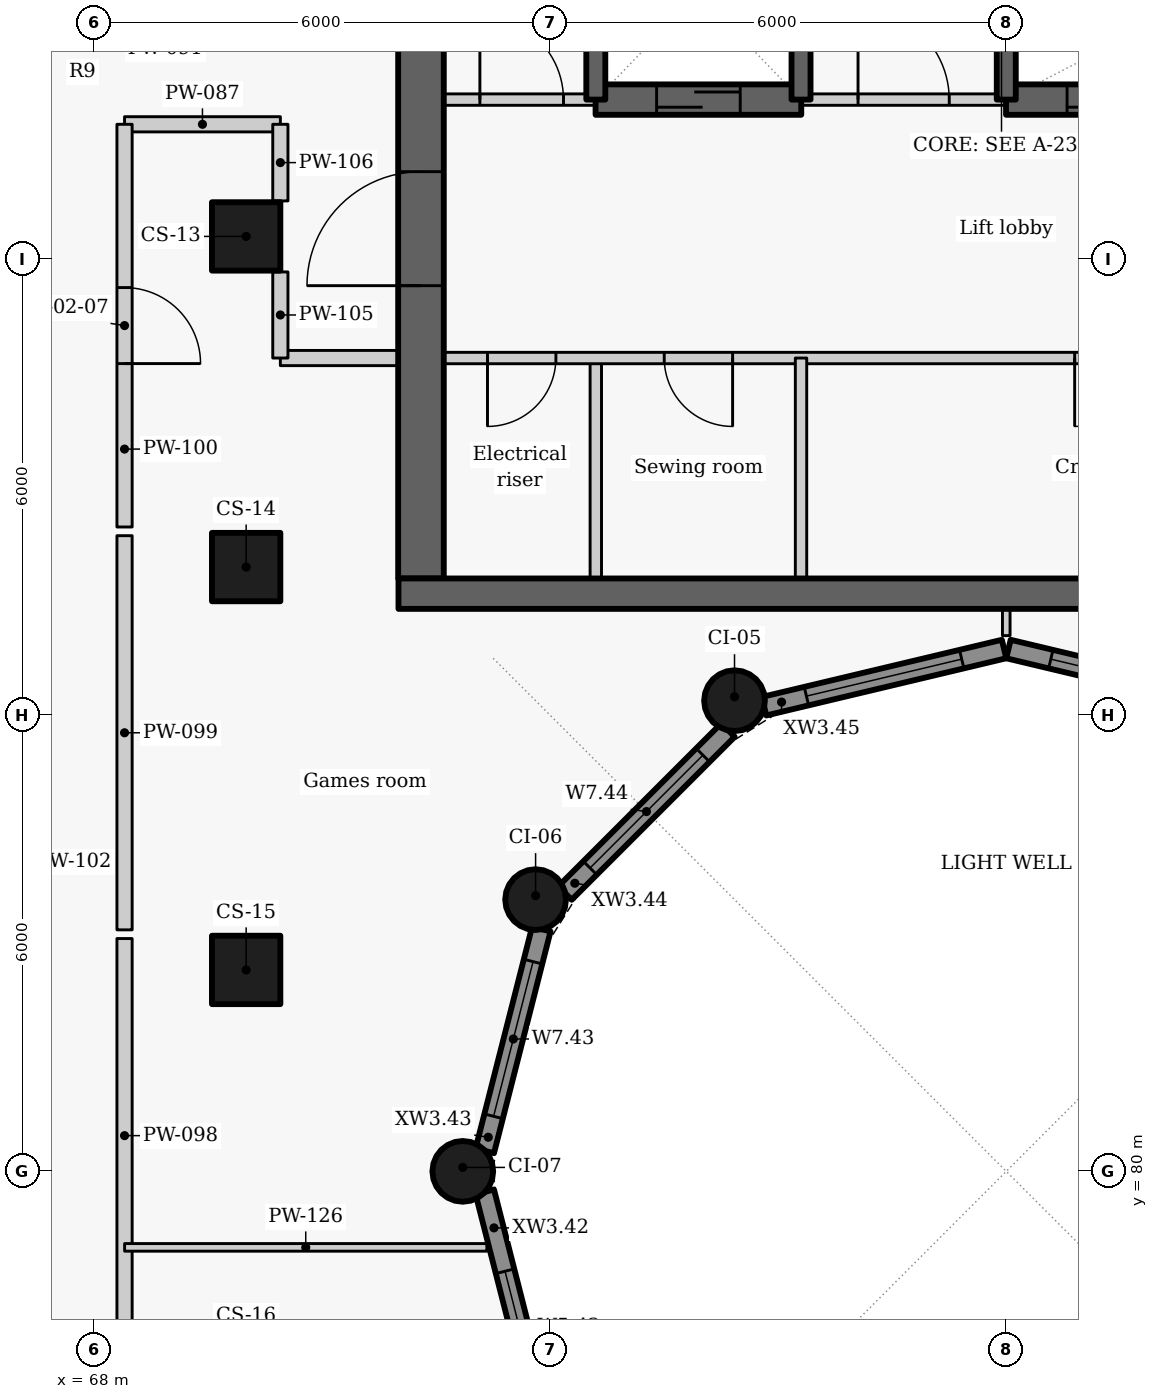
"""IFC4 building model, lengths in metres.
Left out: names, types, materials, properties, quantities, classifications, styles, units other than length and angle.
Written with IfcOpenShell. Run it as: python <this file> out.ifc"""

import sys

from ifc_helpers import new_model, si_unit, direction, frame, frame_2d, origin, origin_2d, place, context, subcontext, project, spatial, rectangle, circle, extrude, element, fill, save


model = new_model("IFC4")
c1 = context("Model", 3, precision=1e-05, world=origin(), true_north=direction((0.0, 1.0)))
c2 = subcontext(c1, "Body", "Model", "MODEL_VIEW")
j1 = project(units=[si_unit("LENGTHUNIT", "METRE"), si_unit("PLANEANGLEUNIT", "RADIAN")], contexts=[c1])
p1 = place(None, origin())
s1 = spatial("IfcSite", under=j1, at=p1, CompositionType="ELEMENT")
p2 = place(p1, origin())
s2 = spatial("IfcBuilding", under=s1, at=p2, CompositionType="ELEMENT")
p3 = place(p2, frame((0.0, 0.0, 183.3)))
s3 = spatial("IfcBuildingStorey", under=s2, at=p3, CompositionType="ELEMENT", Elevation=183.3)
for number, where, z_axis, x_axis in (
    (1, (70.0, 92.3, 0.0), (0.0, 0.0, 1.0), (0.0, -1.0, 0.0)),
    (2, (70.0, 87.95, 0.0), (0.0, 0.0, 1.0), (0.0, -1.0, 0.0)),
    (3, (70.0, 82.65, 0.0), (0.0, 0.0, 1.0), (0.0, -1.0, 0.0)),
):
    element("IfcColumn", number, at=place(p3, frame(where, z_axis=z_axis, x_axis=x_axis)), inside=s3, PredefinedType="COLUMN", context=c2, shape_type="SweptSolid", body=[
        extrude(rectangle(XDim=0.9, YDim=0.9, at=origin_2d()), origin(), (0.0, 0.0, 1.0), 3.3),
    ])
for number, where, z_axis, x_axis in (
    (4, (76.425, 86.192, 0.0), (0.0, 0.0, 1.0), (-0.866, -0.5, 0.0)),
    (5, (73.808, 83.575, 0.0), (0.0, 0.0, 1.0), (-0.5, -0.866, 0.0)),
    (6, (72.85, 80.0, 0.0), (0.0, 0.0, 1.0), (0.0, -1.0, 0.0)),
):
    element("IfcColumn", number, at=place(p3, frame(where, z_axis=z_axis, x_axis=x_axis)), inside=s3, PredefinedType="COLUMN", context=c2, shape_type="SweptSolid", body=[
        extrude(circle(Radius=0.4, at=origin_2d()), origin(), (0.0, 0.0, 1.0), 3.3),
    ])
p4 = place(p3, frame((73.883, 76.813, 0.0), z_axis=(0.0, 0.0, 1.0), x_axis=(-0.247055971283, 0.969001211069, 0.0)))
e7 = element("IfcWall", 7, at=p4, inside=s3, PredefinedType="SOLIDWALL", context=c2, shape_type="SweptSolid", body=[
    extrude(rectangle(XDim=3.01, YDim=0.25, at=frame_2d((1.505, 0.0))), origin(), (0.0, 0.0, 1.0), 2.425),
])
p5 = place(p4, frame((0.433, 0.0, 0.9)))
e8 = element("IfcOpeningElement", 8, at=p5, cuts=e7, PredefinedType="OPENING", context=c2, shape_type="SweptSolid", body=[
    extrude(rectangle(XDim=1.5, YDim=1.1, at=frame_2d((0.75, 0.55))), frame((0.0, 0.135, 0.0), z_axis=(0.0, -1.0, 0.0), x_axis=(1.0, 0.0, 0.0)), (0.0, 0.0, 1.0), 0.27),
])
p6 = place(p3, frame((73.14, 80.27, 0.0), z_axis=(0.0, 0.0, 1.0), x_axis=(0.247055971283, 0.969001211069, 0.0)))
e9 = element("IfcWall", 9, at=p6, inside=s3, PredefinedType="SOLIDWALL", context=c2, shape_type="SweptSolid", body=[
    extrude(rectangle(XDim=3.01, YDim=0.25, at=frame_2d((1.505, 0.0))), origin(), (0.0, 0.0, 1.0), 2.425),
])
p7 = place(p6, frame((0.469, 0.0, 0.9)))
e10 = element("IfcOpeningElement", 10, at=p7, cuts=e9, PredefinedType="OPENING", context=c2, shape_type="SweptSolid", body=[
    extrude(rectangle(XDim=2.1, YDim=1.1, at=frame_2d((1.05, 0.55))), frame((0.0, 0.135, 0.0), z_axis=(0.0, -1.0, 0.0), x_axis=(1.0, 0.0, 0.0)), (0.0, 0.0, 1.0), 0.27),
])
p8 = place(p3, frame((74.194, 83.661, 0.0), z_axis=(0.0, 0.0, 1.0), x_axis=(0.707106781187, 0.707106781187, 0.0)))
e11 = element("IfcWall", 11, at=p8, inside=s3, PredefinedType="SOLIDWALL", context=c2, shape_type="SweptSolid", body=[
    extrude(rectangle(XDim=3.033, YDim=0.25, at=frame_2d((1.517, 0.0))), origin(), (0.0, 0.0, 1.0), 2.425),
])
p9 = place(p8, frame((0.467, 0.0, 0.9)))
e12 = element("IfcOpeningElement", 12, at=p9, cuts=e11, PredefinedType="OPENING", context=c2, shape_type="SweptSolid", body=[
    extrude(rectangle(XDim=2.1, YDim=1.1, at=frame_2d((1.05, 0.55))), frame((0.0, 0.135, 0.0), z_axis=(0.0, -1.0, 0.0), x_axis=(1.0, 0.0, 0.0)), (0.0, 0.0, 1.0), 0.27),
])
p10 = place(p3, frame((76.814, 86.119, 0.0), z_axis=(0.0, 0.0, 1.0), x_axis=(0.972773113459, 0.231759508395, 0.0)))
e13 = element("IfcWall", 13, at=p10, inside=s3, PredefinedType="SOLIDWALL", context=c2, shape_type="SweptSolid", body=[
    extrude(rectangle(XDim=3.246, YDim=0.25, at=frame_2d((1.623, 0.0))), origin(), (0.0, 0.0, 1.0), 2.425),
])
p11 = place(p10, frame((0.573, 0.0, 0.9)))
e14 = element("IfcOpeningElement", 14, at=p11, cuts=e13, PredefinedType="OPENING", context=c2, shape_type="SweptSolid", body=[
    extrude(rectangle(XDim=2.1, YDim=1.1, at=frame_2d((1.05, 0.55))), frame((0.0, 0.135, 0.0), z_axis=(0.0, -1.0, 0.0), x_axis=(1.0, 0.0, 0.0)), (0.0, 0.0, 1.0), 0.27),
])
p12 = place(p3, frame((80.029, 86.872, 0.0), z_axis=(0.0, 0.0, 1.0), x_axis=(0.972773113459, -0.231759508395, 0.0)))
e15 = element("IfcWall", 15, at=p12, inside=s3, PredefinedType="SOLIDWALL", context=c2, shape_type="SweptSolid", body=[
    extrude(rectangle(XDim=3.246, YDim=0.25, at=frame_2d((1.623, 0.0))), origin(), (0.0, 0.0, 1.0), 2.425),
])
p13 = place(p12, frame((0.573, 0.0, 0.9)))
e16 = element("IfcOpeningElement", 16, at=p13, cuts=e15, PredefinedType="OPENING", context=c2, shape_type="SweptSolid", body=[
    extrude(rectangle(XDim=2.1, YDim=1.1, at=frame_2d((1.05, 0.55))), frame((0.0, 0.135, 0.0), z_axis=(0.0, -1.0, 0.0), x_axis=(1.0, 0.0, 0.0)), (0.0, 0.0, 1.0), 0.27),
])
p14 = place(p3, frame((74.6, 87.8, 0.0), z_axis=(0.0, 0.0, 1.0), x_axis=(0.0, 1.0, 0.0)))
e17 = element("IfcWall", 17, at=p14, inside=s3, PredefinedType="PARTITIONING", context=c2, shape_type="SweptSolid", body=[
    extrude(rectangle(XDim=2.9, YDim=0.15, at=frame_2d((1.45, 0.0))), origin(), (0.0, 0.0, 1.0), 3.025),
])
p15 = place(p3, frame((85.4, 90.7, 0.0), z_axis=(0.0, 0.0, 1.0), x_axis=(-1.0, 0.0, 0.0)))
e18 = element("IfcWall", 18, at=p15, inside=s3, PredefinedType="PARTITIONING", context=c2, shape_type="SweptSolid", body=[
    extrude(rectangle(XDim=13.4, YDim=0.15, at=frame_2d((6.7, 0.0))), origin(), (0.0, 0.0, 1.0), 3.025),
])
p16 = place(p15, frame((11.325, 0.0, 0.0)))
e19 = element("IfcOpeningElement", 19, at=p16, cuts=e18, PredefinedType="OPENING", context=c2, shape_type="SweptSolid", body=[
    extrude(rectangle(XDim=0.9, YDim=2.1, at=frame_2d((0.45, 1.05))), frame((0.0, 0.085, 0.0), z_axis=(0.0, -1.0, 0.0), x_axis=(1.0, 0.0, 0.0)), (0.0, 0.0, 1.0), 0.17),
])
p17 = place(p15, frame((9.0, 0.0, 0.0)))
e20 = element("IfcOpeningElement", 20, at=p17, cuts=e18, PredefinedType="OPENING", context=c2, shape_type="SweptSolid", body=[
    extrude(rectangle(XDim=0.9, YDim=2.1, at=frame_2d((0.45, 1.05))), frame((0.0, 0.085, 0.0), z_axis=(0.0, -1.0, 0.0), x_axis=(1.0, 0.0, 0.0)), (0.0, 0.0, 1.0), 0.17),
])
p18 = place(p15, frame((3.6, 0.0, 0.0)))
e21 = element("IfcOpeningElement", 21, at=p18, cuts=e18, PredefinedType="OPENING", context=c2, shape_type="SweptSolid", body=[
    extrude(rectangle(XDim=0.9, YDim=2.1, at=frame_2d((0.45, 1.05))), frame((0.0, 0.085, 0.0), z_axis=(0.0, -1.0, 0.0), x_axis=(1.0, 0.0, 0.0)), (0.0, 0.0, 1.0), 0.17),
])
p19 = place(p3, frame((72.3, 87.8, -0.275), z_axis=(0.0, 0.0, 1.0), x_axis=(0.0, 1.0, 0.0)))
e22 = element("IfcWall", 22, at=p19, inside=s3, PredefinedType="SHEAR", context=c2, shape_type="SweptSolid", body=[
    extrude(rectangle(XDim=9.1, YDim=0.6, at=frame_2d((4.55, 0.0))), origin(), (0.0, 0.0, 1.0), 3.3),
])
p20 = place(p19, frame((3.852, 0.0, 0.275)))
e23 = element("IfcOpeningElement", 23, at=p20, cuts=e22, PredefinedType="OPENING", context=c2, shape_type="SweptSolid", body=[
    extrude(rectangle(XDim=1.5, YDim=2.1, at=frame_2d((0.75, 1.05))), frame((0.0, 0.31, 0.0), z_axis=(0.0, -1.0, 0.0), x_axis=(1.0, 0.0, 0.0)), (0.0, 0.0, 1.0), 0.62),
])
p21 = place(p3, frame((77.3, 87.8, 0.0), z_axis=(0.0, 0.0, 1.0), x_axis=(0.0, 1.0, 0.0)))
e24 = element("IfcWall", 24, at=p21, inside=s3, PredefinedType="PARTITIONING", context=c2, shape_type="SweptSolid", body=[
    extrude(rectangle(XDim=2.9, YDim=0.15, at=frame_2d((1.45, 0.0))), origin(), (0.0, 0.0, 1.0), 3.025),
])
p22 = place(p3, frame((72.0, 94.1, 0.0), z_axis=(0.0, 0.0, 1.0), x_axis=(1.0, 0.0, 0.0)))
e25 = element("IfcWall", 25, at=p22, inside=s3, PredefinedType="PARTITIONING", context=c2, shape_type="SweptSolid", body=[
    extrude(rectangle(XDim=2.603, YDim=0.15, at=frame_2d((1.302, 0.0))), origin(), (0.0, 0.0, 1.0), 3.025),
])
p23 = place(p22, frame((1.075, 0.0, 0.0)))
e26 = element("IfcOpeningElement", 26, at=p23, cuts=e25, PredefinedType="OPENING", context=c2, shape_type="SweptSolid", body=[
    extrude(rectangle(XDim=1.1, YDim=2.1, at=frame_2d((0.55, 1.05))), frame((0.0, 0.085, 0.0), z_axis=(0.0, -1.0, 0.0), x_axis=(1.0, 0.0, 0.0)), (0.0, 0.0, 1.0), 0.17),
])
p24 = place(p3, frame((77.297, 94.1, 0.0), z_axis=(0.0, 0.0, 1.0), x_axis=(1.0, 0.0, 0.0)))
e27 = element("IfcWall", 27, at=p24, inside=s3, PredefinedType="PARTITIONING", context=c2, shape_type="SweptSolid", body=[
    extrude(rectangle(XDim=2.706, YDim=0.15, at=frame_2d((1.353, 0.0))), origin(), (0.0, 0.0, 1.0), 3.025),
])
p25 = place(p24, frame((0.753, 0.0, 0.0)))
e28 = element("IfcOpeningElement", 28, at=p25, cuts=e27, PredefinedType="OPENING", context=c2, shape_type="SweptSolid", body=[
    extrude(rectangle(XDim=1.2, YDim=2.1, at=frame_2d((0.6, 1.05))), frame((0.0, 0.085, 0.0), z_axis=(0.0, -1.0, 0.0), x_axis=(1.0, 0.0, 0.0)), (0.0, 0.0, 1.0), 0.17),
])
p26 = place(p3, frame((74.597, 94.1, -0.275), z_axis=(0.0, 0.0, 1.0), x_axis=(1.0, 0.0, 0.0)))
e29 = element("IfcWall", 29, at=p26, inside=s3, PredefinedType="SHEAR", context=c2, shape_type="SweptSolid", body=[
    extrude(rectangle(XDim=2.706, YDim=0.4, at=frame_2d((1.353, 0.0))), origin(), (0.0, 0.0, 1.0), 3.3),
])
p27 = place(p26, frame((0.803, 0.0, 0.275)))
e30 = element("IfcOpeningElement", 30, at=p27, cuts=e29, PredefinedType="OPENING", context=c2, shape_type="SweptSolid", body=[
    extrude(rectangle(XDim=1.1, YDim=2.1, at=frame_2d((0.55, 1.05))), frame((0.0, 0.21, 0.0), z_axis=(0.0, -1.0, 0.0), x_axis=(1.0, 0.0, 0.0)), (0.0, 0.0, 1.0), 0.42),
])
p28 = place(p3, frame((79.997, 94.1, -0.275), z_axis=(0.0, 0.0, 1.0), x_axis=(1.0, 0.0, 0.0)))
e31 = element("IfcWall", 31, at=p28, inside=s3, PredefinedType="SHEAR", context=c2, shape_type="SweptSolid", body=[
    extrude(rectangle(XDim=5.406, YDim=0.4, at=frame_2d((2.703, 0.0))), origin(), (0.0, 0.0, 1.0), 3.3),
])
p29 = place(p28, frame((0.803, 0.0, 0.275)))
e32 = element("IfcOpeningElement", 32, at=p29, cuts=e31, PredefinedType="OPENING", context=c2, shape_type="SweptSolid", body=[
    extrude(rectangle(XDim=1.1, YDim=2.1, at=frame_2d((0.55, 1.05))), frame((0.0, 0.21, 0.0), z_axis=(0.0, -1.0, 0.0), x_axis=(1.0, 0.0, 0.0)), (0.0, 0.0, 1.0), 0.42),
])
for number, where, z_axis, x_axis in (
    (33, (74.6, 94.1, -0.275), (0.0, 0.0, 1.0), (0.0, 1.0, 0.0)),
    (34, (77.3, 94.1, -0.275), (0.0, 0.0, 1.0), (0.0, 1.0, 0.0)),
    (35, (80.0, 94.1, -0.275), (0.0, 0.0, 1.0), (0.0, 1.0, 0.0)),
):
    element("IfcWall", number, at=place(p3, frame(where, z_axis=z_axis, x_axis=x_axis)), inside=s3, PredefinedType="SHEAR", context=c2, shape_type="SweptSolid", body=[
        extrude(rectangle(XDim=2.8, YDim=0.25, at=frame_2d((1.4, 0.0))), origin(), (0.0, 0.0, 1.0), 3.3),
    ])
p30 = place(p3, frame((68.4, 93.775, 0.0), z_axis=(0.0, 0.0, 1.0), x_axis=(1.0, 0.0, 0.0)))
e36 = element("IfcWall", 36, at=p30, inside=s3, PredefinedType="PARTITIONING", context=c2, shape_type="SweptSolid", body=[
    extrude(rectangle(XDim=2.05, YDim=0.2, at=frame_2d((1.025, 0.0))), origin(), (0.0, 0.0, 1.0), 2.505),
])
p31 = place(p3, frame((70.45, 90.7, 0.0), z_axis=(0.0, 0.0, 1.0), x_axis=(1.0, 0.0, 0.0)))
e37 = element("IfcWall", 37, at=p31, inside=s3, PredefinedType="PARTITIONING", context=c2, shape_type="SweptSolid", body=[
    extrude(rectangle(XDim=1.55, YDim=0.2, at=frame_2d((0.775, 0.0))), origin(), (0.0, 0.0, 1.0), 3.025),
])
for number, where, z_axis, x_axis in (
    (38, (68.4, 77.877, 0.0), (0.0, 0.0, 1.0), (0.0, 1.0, 0.0)),
    (39, (68.4, 83.177, 0.0), (0.0, 0.0, 1.0), (0.0, 1.0, 0.0)),
):
    element("IfcWall", number, at=place(p3, frame(where, z_axis=z_axis, x_axis=x_axis)), inside=s3, PredefinedType="PARTITIONING", context=c2, shape_type="SweptSolid", body=[
        extrude(rectangle(XDim=5.186, YDim=0.2, at=frame_2d((2.593, 0.0))), origin(), (0.0, 0.0, 1.0), 3.025),
    ])
p32 = place(p3, frame((68.4, 93.775, 0.0), z_axis=(0.0, 0.0, 1.0), x_axis=(0.0, -1.0, 0.0)))
e40 = element("IfcWall", 40, at=p32, inside=s3, PredefinedType="PARTITIONING", context=c2, shape_type="SweptSolid", body=[
    extrude(rectangle(XDim=5.298, YDim=0.2, at=frame_2d((2.649, 0.0))), origin(), (0.0, 0.0, 1.0), 3.025),
])
p33 = place(p32, frame((2.148, 0.0, 0.0)))
e41 = element("IfcOpeningElement", 41, at=p33, cuts=e40, PredefinedType="OPENING", context=c2, shape_type="SweptSolid", body=[
    extrude(rectangle(XDim=1.0, YDim=2.1, at=frame_2d((0.5, 1.05))), frame((0.0, 0.11, 0.0), z_axis=(0.0, -1.0, 0.0), x_axis=(1.0, 0.0, 0.0)), (0.0, 0.0, 1.0), 0.22),
])
p34 = place(p3, frame((70.45, 90.7, 0.0), z_axis=(0.0, 0.0, 1.0), x_axis=(0.0, 1.0, 0.0)))
e42 = element("IfcWall", 42, at=p34, inside=s3, PredefinedType="PARTITIONING", context=c2, shape_type="SweptSolid", body=[
    extrude(rectangle(XDim=1.133, YDim=0.2, at=frame_2d((0.566, 0.0))), origin(), (0.0, 0.0, 1.0), 3.025),
])
p35 = place(p3, frame((70.45, 92.767, 0.0), z_axis=(0.0, 0.0, 1.0), x_axis=(0.0, 1.0, 0.0)))
e43 = element("IfcWall", 43, at=p35, inside=s3, PredefinedType="PARTITIONING", context=c2, shape_type="SweptSolid", body=[
    extrude(rectangle(XDim=1.008, YDim=0.2, at=frame_2d((0.504, 0.0))), origin(), (0.0, 0.0, 1.0), 3.025),
])
p36 = place(p3, frame((80.0, 87.048, 0.0), z_axis=(0.0, 0.0, 1.0), x_axis=(0.0, 1.0, 0.0)))
e44 = element("IfcWall", 44, at=p36, inside=s3, PredefinedType="PARTITIONING", context=c2, shape_type="SweptSolid", body=[
    extrude(rectangle(XDim=0.352, YDim=0.1, at=frame_2d((0.176, 0.0))), origin(), (0.0, 0.0, 1.0), 3.025),
])
p37 = place(p3, frame((68.401, 79.0, 0.0), z_axis=(0.0, 0.0, 1.0), x_axis=(1.0, 0.0, 0.0)))
e45 = element("IfcWall", 45, at=p37, inside=s3, PredefinedType="PARTITIONING", context=c2, shape_type="SweptSolid", body=[
    extrude(rectangle(XDim=4.766, YDim=0.1, at=frame_2d((2.383, 0.0))), origin(), (0.0, 0.0, 1.0), 2.505),
])
p38 = place(p3, frame((72.004, 87.6, -0.275), z_axis=(0.0, 0.0, 1.0), x_axis=(1.0, 0.0, 0.0)))
e46 = element("IfcWall", 46, at=p38, inside=s3, PredefinedType="SHEAR", context=c2, shape_type="SweptSolid", body=[
    extrude(rectangle(XDim=15.992, YDim=0.4, at=frame_2d((7.996, 0.0))), origin(), (0.0, 0.0, 1.0), 3.3),
])
p39 = place(p5, origin())
e47 = element("IfcWindow", 47, at=p39, inside=s3, PartitioningType="SINGLE_PANEL", PredefinedType="WINDOW", context=c2, shape_type="SweptSolid", body=[
    extrude(rectangle(XDim=1.5, YDim=1.1, at=frame_2d((0.75, 0.55))), frame((0.0, 0.03, 0.0), z_axis=(0.0, -1.0, 0.0), x_axis=(1.0, 0.0, 0.0)), (0.0, 0.0, 1.0), 0.06),
])
fill(e8, e47)
p40 = place(p7, origin())
e48 = element("IfcWindow", 48, at=p40, inside=s3, PartitioningType="SINGLE_PANEL", PredefinedType="WINDOW", context=c2, shape_type="SweptSolid", body=[
    extrude(rectangle(XDim=2.1, YDim=1.1, at=frame_2d((1.05, 0.55))), frame((0.0, 0.03, 0.0), z_axis=(0.0, -1.0, 0.0), x_axis=(1.0, 0.0, 0.0)), (0.0, 0.0, 1.0), 0.06),
])
fill(e10, e48)
p41 = place(p9, origin())
e49 = element("IfcWindow", 49, at=p41, inside=s3, PartitioningType="SINGLE_PANEL", PredefinedType="WINDOW", context=c2, shape_type="SweptSolid", body=[
    extrude(rectangle(XDim=2.1, YDim=1.1, at=frame_2d((1.05, 0.55))), frame((0.0, 0.03, 0.0), z_axis=(0.0, -1.0, 0.0), x_axis=(1.0, 0.0, 0.0)), (0.0, 0.0, 1.0), 0.06),
])
fill(e12, e49)
p42 = place(p11, origin())
e50 = element("IfcWindow", 50, at=p42, inside=s3, PartitioningType="SINGLE_PANEL", PredefinedType="WINDOW", context=c2, shape_type="SweptSolid", body=[
    extrude(rectangle(XDim=2.1, YDim=1.1, at=frame_2d((1.05, 0.55))), frame((0.0, 0.03, 0.0), z_axis=(0.0, -1.0, 0.0), x_axis=(1.0, 0.0, 0.0)), (0.0, 0.0, 1.0), 0.06),
])
fill(e14, e50)
p43 = place(p13, origin())
e51 = element("IfcWindow", 51, at=p43, inside=s3, PartitioningType="SINGLE_PANEL", PredefinedType="WINDOW", context=c2, shape_type="SweptSolid", body=[
    extrude(rectangle(XDim=2.1, YDim=1.1, at=frame_2d((1.05, 0.55))), frame((0.0, 0.03, 0.0), z_axis=(0.0, -1.0, 0.0), x_axis=(1.0, 0.0, 0.0)), (0.0, 0.0, 1.0), 0.06),
])
fill(e16, e51)
p44 = place(p16, origin())
e52 = element("IfcDoor", 52, at=p44, inside=s3, OperationType="SINGLE_SWING_RIGHT", PredefinedType="DOOR", context=c2, shape_type="SweptSolid", body=[
    extrude(rectangle(XDim=0.9, YDim=2.1, at=frame_2d((0.45, 1.05))), frame((0.0, 0.025, 0.0), z_axis=(0.0, -1.0, 0.0), x_axis=(1.0, 0.0, 0.0)), (0.0, 0.0, 1.0), 0.05),
])
fill(e19, e52)
p45 = place(p17, origin())
e53 = element("IfcDoor", 53, at=p45, inside=s3, OperationType="SINGLE_SWING_LEFT", PredefinedType="DOOR", context=c2, shape_type="SweptSolid", body=[
    extrude(rectangle(XDim=0.9, YDim=2.1, at=frame_2d((0.45, 1.05))), frame((0.0, 0.025, 0.0), z_axis=(0.0, -1.0, 0.0), x_axis=(1.0, 0.0, 0.0)), (0.0, 0.0, 1.0), 0.05),
])
fill(e20, e53)
p46 = place(p18, origin())
e54 = element("IfcDoor", 54, at=p46, inside=s3, OperationType="SINGLE_SWING_RIGHT", PredefinedType="DOOR", context=c2, shape_type="SweptSolid", body=[
    extrude(rectangle(XDim=0.9, YDim=2.1, at=frame_2d((0.45, 1.05))), frame((0.0, 0.025, 0.0), z_axis=(0.0, -1.0, 0.0), x_axis=(1.0, 0.0, 0.0)), (0.0, 0.0, 1.0), 0.05),
])
fill(e21, e54)
p47 = place(p23, origin())
e55 = element("IfcDoor", 55, at=p47, inside=s3, OperationType="SINGLE_SWING_LEFT", PredefinedType="DOOR", context=c2, shape_type="SweptSolid", body=[
    extrude(rectangle(XDim=1.1, YDim=2.1, at=frame_2d((0.55, 1.05))), frame((0.0, 0.025, 0.0), z_axis=(0.0, -1.0, 0.0), x_axis=(1.0, 0.0, 0.0)), (0.0, 0.0, 1.0), 0.05),
])
fill(e26, e55)
p48 = place(p27, origin())
e56 = element("IfcDoor", 56, at=p48, inside=s3, OperationType="SLIDING_TO_LEFT", PredefinedType="DOOR", context=c2, shape_type="SweptSolid", body=[
    extrude(rectangle(XDim=1.1, YDim=2.1, at=frame_2d((0.55, 1.05))), frame((0.0, 0.025, 0.0), z_axis=(0.0, -1.0, 0.0), x_axis=(1.0, 0.0, 0.0)), (0.0, 0.0, 1.0), 0.05),
])
fill(e30, e56)
p49 = place(p25, origin())
e57 = element("IfcDoor", 57, at=p49, inside=s3, OperationType="DOUBLE_DOOR_SINGLE_SWING", PredefinedType="DOOR", context=c2, shape_type="SweptSolid", body=[
    extrude(rectangle(XDim=1.2, YDim=2.1, at=frame_2d((0.6, 1.05))), frame((0.0, 0.025, 0.0), z_axis=(0.0, -1.0, 0.0), x_axis=(1.0, 0.0, 0.0)), (0.0, 0.0, 1.0), 0.05),
])
fill(e28, e57)
p50 = place(p29, origin())
e58 = element("IfcDoor", 58, at=p50, inside=s3, OperationType="SLIDING_TO_LEFT", PredefinedType="DOOR", context=c2, shape_type="SweptSolid", body=[
    extrude(rectangle(XDim=1.1, YDim=2.1, at=frame_2d((0.55, 1.05))), frame((0.0, 0.025, 0.0), z_axis=(0.0, -1.0, 0.0), x_axis=(1.0, 0.0, 0.0)), (0.0, 0.0, 1.0), 0.05),
])
fill(e32, e58)
p51 = place(p33, origin())
e59 = element("IfcDoor", 59, at=p51, inside=s3, OperationType="SINGLE_SWING_RIGHT", PredefinedType="DOOR", context=c2, shape_type="SweptSolid", body=[
    extrude(rectangle(XDim=1.0, YDim=2.1, at=frame_2d((0.5, 1.05))), frame((0.0, 0.025, 0.0), z_axis=(0.0, -1.0, 0.0), x_axis=(1.0, 0.0, 0.0)), (0.0, 0.0, 1.0), 0.05),
])
fill(e41, e59)
p52 = place(p20, origin())
e60 = element("IfcDoor", 60, at=p52, inside=s3, OperationType="DOUBLE_DOOR_SINGLE_SWING", PredefinedType="DOOR", context=c2, shape_type="SweptSolid", body=[
    extrude(rectangle(XDim=1.5, YDim=2.1, at=frame_2d((0.75, 1.05))), frame((0.0, 0.025, 0.0), z_axis=(0.0, -1.0, 0.0), x_axis=(1.0, 0.0, 0.0)), (0.0, 0.0, 1.0), 0.05),
])
fill(e23, e60)
save(model, sys.argv[1])
